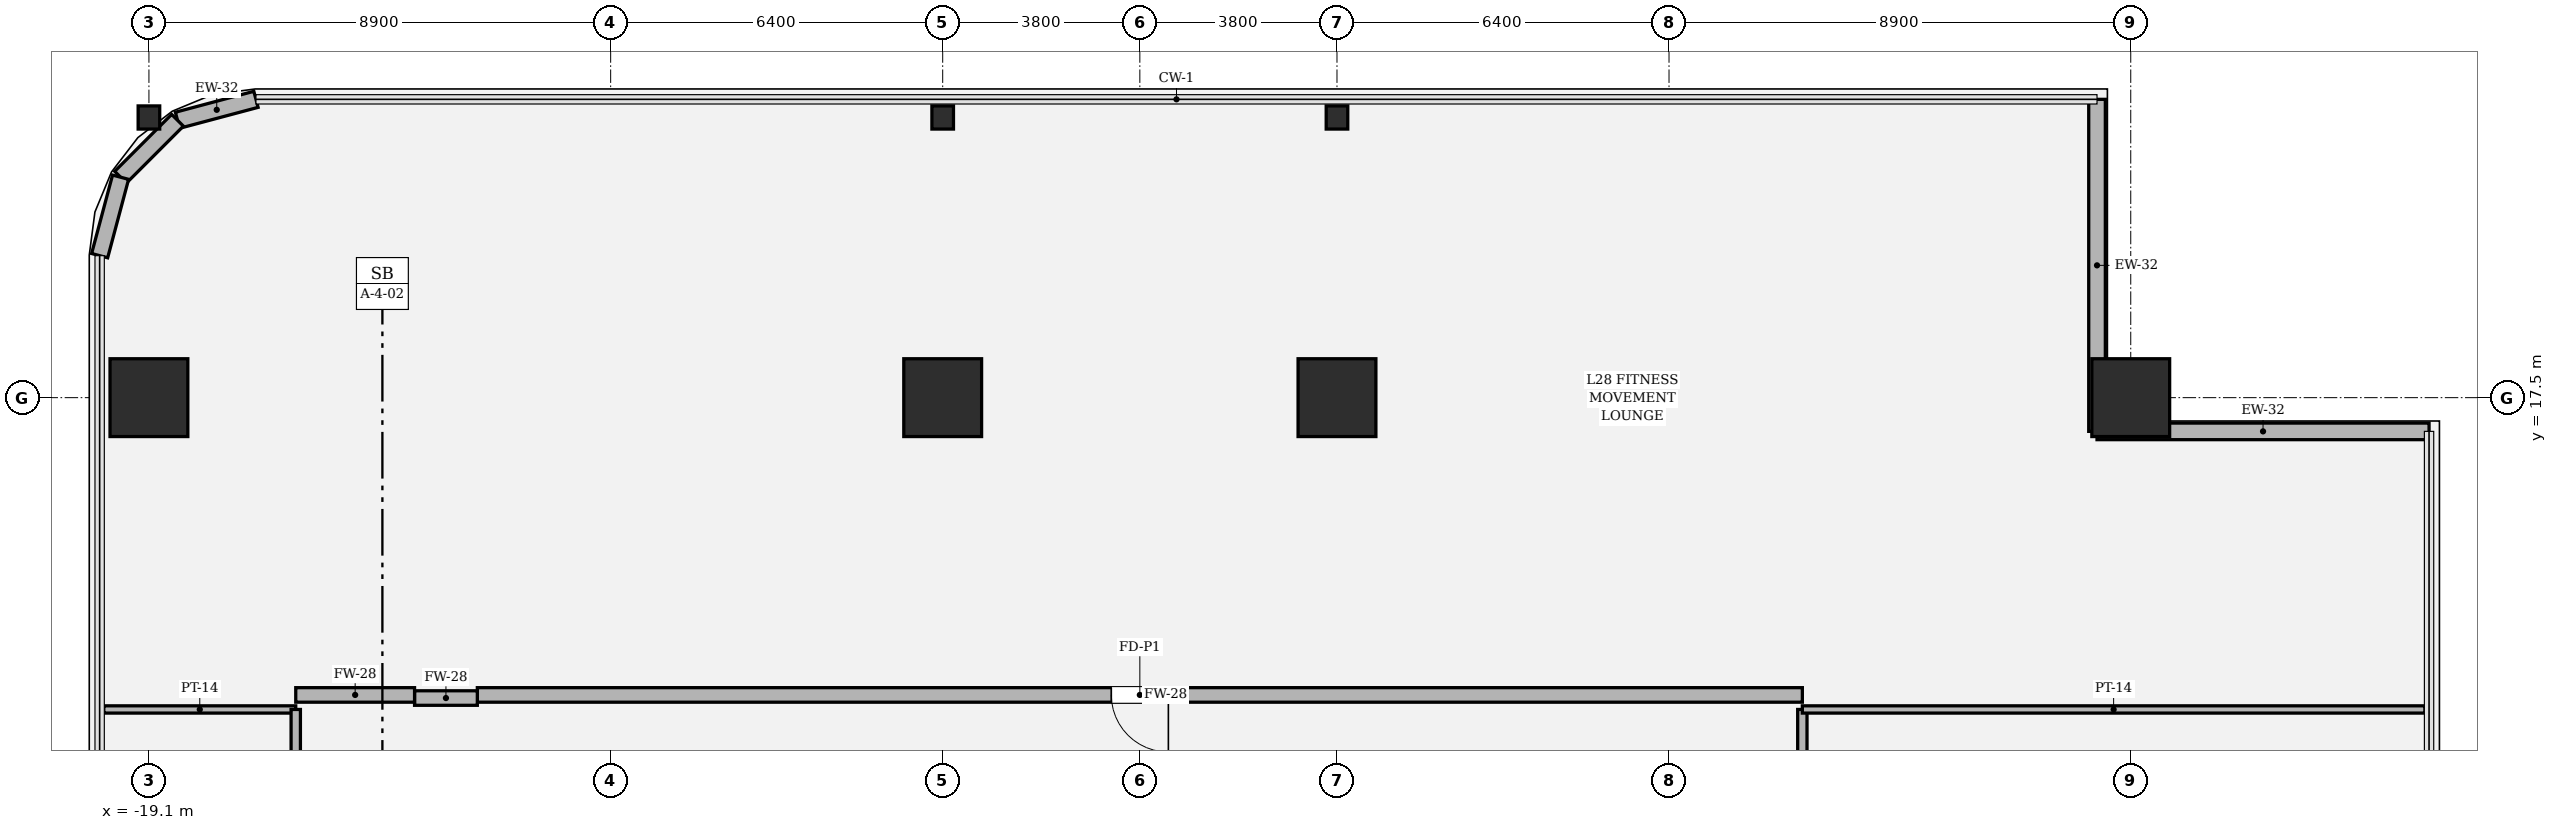
"""IFC4 building model, lengths in metres.
Left out: names, types, materials, properties, quantities, classifications, styles, units other than length and angle.
Written with IfcOpenShell. Run it as: python <this file> out.ifc"""

import sys

from ifc_helpers import new_model, si_unit, direction, frame, frame_2d, origin, origin_2d, place, context, subcontext, project, spatial, rectangle, hollow_rectangle, i_section, extrude, element, fill, save


model = new_model("IFC4")
c1 = context("Model", 3, precision=1e-05, world=origin(), true_north=direction((0.0, 1.0)))
c2 = subcontext(c1, "Body", "Model", "MODEL_VIEW")
j1 = project(units=[si_unit("LENGTHUNIT", "METRE"), si_unit("PLANEANGLEUNIT", "RADIAN")], contexts=[c1])
p1 = place(None, origin())
s1 = spatial("IfcSite", under=j1, at=p1, CompositionType="ELEMENT")
p2 = place(p1, origin())
s2 = spatial("IfcBuilding", under=s1, at=p2, CompositionType="ELEMENT")
p3 = place(p2, frame((0.0, 0.0, 121.35)))
s3 = spatial("IfcBuildingStorey", under=s2, at=p3, CompositionType="ELEMENT", Elevation=121.35)
for number, where, z_axis, x_axis in (
    (1, (19.1, 17.5, 0.0), (0.0, 0.0, 1.0), (1.0, 0.0, 0.0)),
    (2, (3.8, 17.5, 0.0), (0.0, 0.0, 1.0), (1.0, 0.0, 0.0)),
    (3, (-3.8, 17.5, 0.0), (0.0, 0.0, 1.0), (1.0, 0.0, 0.0)),
    (4, (-19.1, 17.5, 0.0), (0.0, 0.0, 1.0), (1.0, 0.0, 0.0)),
):
    element("IfcColumn", number, at=place(p3, frame(where, z_axis=z_axis, x_axis=x_axis)), inside=s3, PredefinedType="COLUMN", context=c2, shape_type="SweptSolid", body=[
        extrude(hollow_rectangle(XDim=1.5, YDim=1.5, WallThickness=0.045, at=origin_2d()), origin(), (0.0, 0.0, 1.0), 4.05),
    ])
for number, where, z_axis, x_axis in (
    (5, (-19.1, 22.9, 0.0), (0.0, 0.0, 1.0), (1.0, 0.0, 0.0)),
    (6, (-3.8, 22.9, 0.0), (0.0, 0.0, 1.0), (1.0, 0.0, 0.0)),
    (7, (3.8, 22.9, 0.0), (0.0, 0.0, 1.0), (1.0, 0.0, 0.0)),
):
    element("IfcColumn", number, at=place(p3, frame(where, z_axis=z_axis, x_axis=x_axis)), inside=s3, PredefinedType="COLUMN", context=c2, shape_type="SweptSolid", body=[
        extrude(i_section(OverallWidth=0.416, OverallDepth=0.446, WebThickness=0.039, FlangeThickness=0.062, FilletRadius=0.018, at=origin_2d()), origin(), (0.0, 0.0, 1.0), 4.048),
    ])
p4 = place(p3, frame((24.85, 16.85, 0.0), z_axis=(0.0, 0.0, 1.0), x_axis=(-1.0, 0.0, 0.0)))
e8 = element("IfcWall", 8, at=p4, inside=s3, PredefinedType="SOLIDWALL", context=c2, shape_type="SweptSolid", body=[
    extrude(rectangle(XDim=6.4, YDim=0.32, at=frame_2d((3.2, 0.0))), origin(), (0.0, 0.0, 1.0), 2.404),
])
p5 = place(p3, frame((18.45, 16.85, 0.0), z_axis=(0.0, 0.0, 1.0), x_axis=(0.0, 1.0, 0.0)))
e9 = element("IfcWall", 9, at=p5, inside=s3, PredefinedType="SOLIDWALL", context=c2, shape_type="SweptSolid", body=[
    extrude(rectangle(XDim=6.4, YDim=0.32, at=frame_2d((3.2, 0.0))), origin(), (0.0, 0.0, 1.0), 2.404),
])
p6 = place(p3, frame((-17.037, 23.25, 0.0), z_axis=(0.0, 0.0, 1.0), x_axis=(-0.966224582397, -0.257701486942, 0.0)))
e10 = element("IfcWall", 10, at=p6, inside=s3, PredefinedType="SOLIDWALL", context=c2, shape_type="SweptSolid", body=[
    extrude(rectangle(XDim=1.565, YDim=0.32, at=frame_2d((0.783, 0.0))), origin(), (0.0, 0.0, 1.0), 3.73),
])
p7 = place(p3, frame((-18.549, 22.847, 0.0), z_axis=(0.0, 0.0, 1.0), x_axis=(-0.707028130747, -0.707185422879, 0.0)))
e11 = element("IfcWall", 11, at=p7, inside=s3, PredefinedType="SOLIDWALL", context=c2, shape_type="SweptSolid", body=[
    extrude(rectangle(XDim=1.552, YDim=0.32, at=frame_2d((0.776, 0.0))), origin(), (0.0, 0.0, 1.0), 3.73),
])
p8 = place(p3, frame((-19.646, 21.749, 0.0), z_axis=(0.0, 0.0, 1.0), x_axis=(-0.257847112249, -0.966185730957, 0.0)))
e12 = element("IfcWall", 12, at=p8, inside=s3, PredefinedType="SOLIDWALL", context=c2, shape_type="SweptSolid", body=[
    extrude(rectangle(XDim=1.565, YDim=0.32, at=frame_2d((0.783, 0.0))), origin(), (0.0, 0.0, 1.0), 3.73),
])
p9 = place(p3, frame((-19.97, 11.49, 0.0), z_axis=(0.0, 0.0, 1.0), x_axis=(1.0, 0.0, 0.0)))
e13 = element("IfcWall", 13, at=p9, inside=s3, PredefinedType="PARTITIONING", context=c2, shape_type="SweptSolid", body=[
    extrude(rectangle(XDim=3.7, YDim=0.14, at=frame_2d((1.85, 0.0))), origin(), (0.0, 0.0, 1.0), 2.404),
])
p10 = place(p3, frame((-16.27, 11.49, 0.0), z_axis=(0.0, 0.0, 1.0), x_axis=(0.0, -1.0, 0.0)))
e14 = element("IfcWall", 14, at=p10, inside=s3, PredefinedType="PARTITIONING", context=c2, shape_type="SweptSolid", body=[
    extrude(rectangle(XDim=13.38, YDim=0.18, at=frame_2d((6.69, 0.0))), origin(), (0.0, 0.0, 1.0), 2.404),
])
p11 = place(p10, frame((6.165, 0.0, 0.0)))
e15 = element("IfcOpeningElement", 15, at=p11, cuts=e14, PredefinedType="OPENING", context=c2, shape_type="SweptSolid", body=[
    extrude(rectangle(XDim=1.05, YDim=2.2, at=frame_2d((0.525, 1.1))), frame((0.0, 0.1, 0.0), z_axis=(0.0, -1.0, 0.0), x_axis=(1.0, 0.0, 0.0)), (0.0, 0.0, 1.0), 0.2),
])
p12 = place(p3, frame((12.77, 1.89, 0.0), z_axis=(0.0, 0.0, 1.0), x_axis=(0.0, 1.0, 0.0)))
e16 = element("IfcWall", 16, at=p12, inside=s3, PredefinedType="PARTITIONING", context=c2, shape_type="SweptSolid", body=[
    extrude(rectangle(XDim=9.6, YDim=0.18, at=frame_2d((4.8, 0.0))), origin(), (0.0, 0.0, 1.0), 2.404),
])
p13 = place(p12, frame((4.275, 0.0, 0.0)))
e17 = element("IfcOpeningElement", 17, at=p13, cuts=e16, PredefinedType="OPENING", context=c2, shape_type="SweptSolid", body=[
    extrude(rectangle(XDim=1.05, YDim=2.2, at=frame_2d((0.525, 1.1))), frame((0.0, 0.1, 0.0), z_axis=(0.0, -1.0, 0.0), x_axis=(1.0, 0.0, 0.0)), (0.0, 0.0, 1.0), 0.2),
])
p14 = place(p3, frame((12.77, 11.49, 0.0), z_axis=(0.0, 0.0, 1.0), x_axis=(1.0, 0.0, 0.0)))
e18 = element("IfcWall", 18, at=p14, inside=s3, PredefinedType="PARTITIONING", context=c2, shape_type="SweptSolid", body=[
    extrude(rectangle(XDim=12.0, YDim=0.14, at=frame_2d((6.0, 0.0))), origin(), (0.0, 0.0, 1.0), 2.404),
])
p15 = place(p3, frame((12.77, 11.77, 0.0), z_axis=(0.0, 0.0, 1.0), x_axis=(-1.0, 0.0, 0.0)))
e19 = element("IfcWall", 19, at=p15, inside=s3, PredefinedType="SOLIDWALL", context=c2, shape_type="SweptSolid", body=[
    extrude(rectangle(XDim=25.54, YDim=0.28, at=frame_2d((12.77, 0.0))), origin(), (0.0, 0.0, 1.0), 2.404),
])
p16 = place(p15, frame((12.22, 0.0, 0.0)))
e20 = element("IfcOpeningElement", 20, at=p16, cuts=e19, PredefinedType="OPENING", context=c2, shape_type="SweptSolid", body=[
    extrude(rectangle(XDim=1.1, YDim=2.2, at=frame_2d((0.55, 1.1))), frame((0.0, 0.15, 0.0), z_axis=(0.0, -1.0, 0.0), x_axis=(1.0, 0.0, 0.0)), (0.0, 0.0, 1.0), 0.3),
])
p17 = place(p3, frame((-12.77, 11.71, 0.0), z_axis=(0.0, 0.0, 1.0), x_axis=(-1.0, 0.0, 0.0)))
e21 = element("IfcWall", 21, at=p17, inside=s3, PredefinedType="SOLIDWALL", context=c2, shape_type="SweptSolid", body=[
    extrude(rectangle(XDim=1.21, YDim=0.28, at=frame_2d((0.605, 0.0))), origin(), (0.0, 0.0, 1.0), 3.73),
])
p18 = place(p3, frame((-13.98, 11.77, 0.0), z_axis=(0.0, 0.0, 1.0), x_axis=(-1.0, 0.0, 0.0)))
e22 = element("IfcWall", 22, at=p18, inside=s3, PredefinedType="SOLIDWALL", context=c2, shape_type="SweptSolid", body=[
    extrude(rectangle(XDim=2.29, YDim=0.28, at=frame_2d((1.145, 0.0))), origin(), (0.0, 0.0, 1.0), 2.444),
])
p19 = place(p16, origin())
e23 = element("IfcDoor", 23, at=p19, inside=s3, OperationType="SINGLE_SWING_LEFT", PredefinedType="DOOR", context=c2, shape_type="SweptSolid", body=[
    extrude(rectangle(XDim=1.1, YDim=2.2, at=frame_2d((0.55, 1.1))), frame((0.0, 0.025, 0.0), z_axis=(0.0, -1.0, 0.0), x_axis=(1.0, 0.0, 0.0)), (0.0, 0.0, 1.0), 0.05),
])
fill(e20, e23)
save(model, sys.argv[1])
